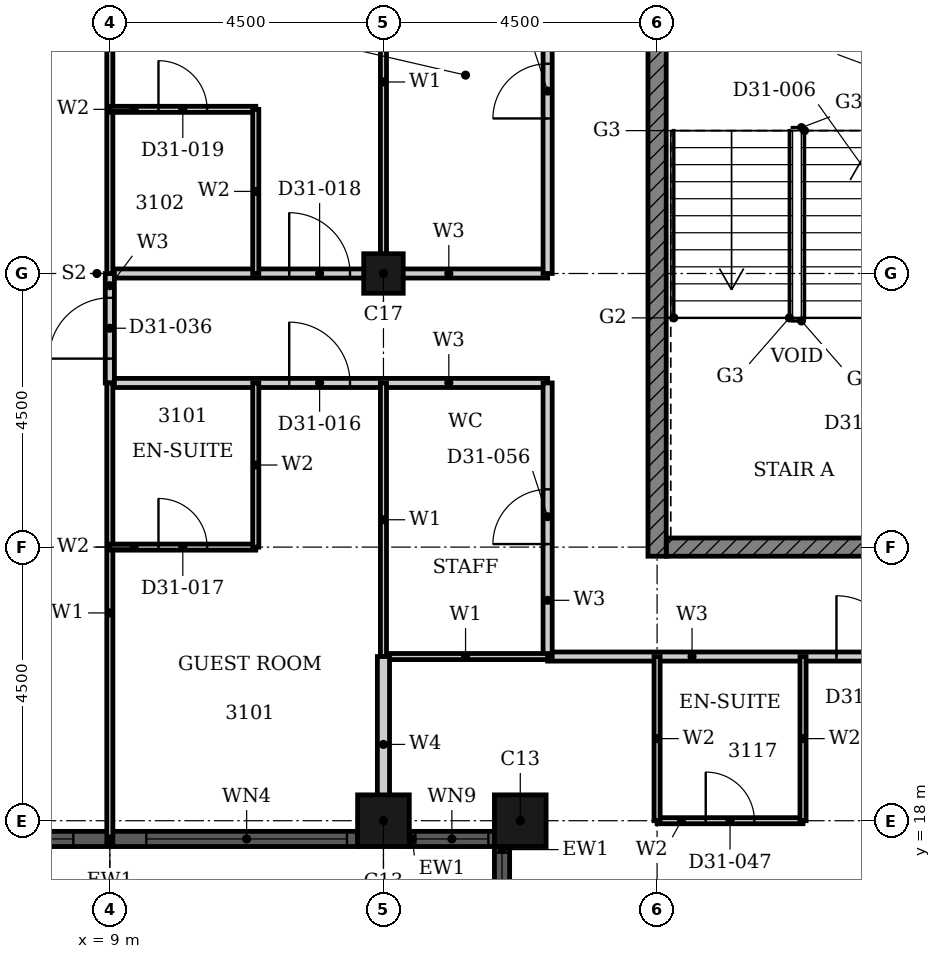
"""IFC4 building model, lengths in metres.
Left out: names, types, materials, properties, quantities, classifications, styles, units other than length and angle.
Written with IfcOpenShell. Run it as: python <this file> out.ifc"""

import sys

from ifc_helpers import new_model, si_unit, direction, frame, frame_2d, origin, origin_2d, place, context, subcontext, project, spatial, rectangle, hollow_rectangle, extrude, element, fill, save


model = new_model("IFC4")
c1 = context("Model", 3, precision=1e-05, world=origin(), true_north=direction((0.0, 1.0)))
c2 = subcontext(c1, "Body", "Model", "MODEL_VIEW")
j1 = project(units=[si_unit("LENGTHUNIT", "METRE"), si_unit("PLANEANGLEUNIT", "RADIAN")], contexts=[c1])
p1 = place(None, origin())
s1 = spatial("IfcSite", under=j1, at=p1, CompositionType="ELEMENT")
p2 = place(p1, origin())
s2 = spatial("IfcBuilding", under=s1, at=p2, CompositionType="ELEMENT")
p3 = place(p2, frame((0.0, 0.0, 126.0)))
s3 = spatial("IfcBuildingStorey", under=s2, at=p3, CompositionType="ELEMENT", Elevation=126.0)
for number, where, z_axis, x_axis in (
    (1, (13.5, 18.0, 0.0), (0.0, 0.0, 1.0), (1.0, 0.0, 0.0)),
    (2, (15.75, 18.0, 0.0), (0.0, 0.0, 1.0), (1.0, 0.0, 0.0)),
):
    element("IfcColumn", number, at=place(p3, frame(where, z_axis=z_axis, x_axis=x_axis)), inside=s3, PredefinedType="COLUMN", context=c2, shape_type="SweptSolid", body=[
        extrude(hollow_rectangle(XDim=0.85, YDim=0.85, WallThickness=0.026, at=origin_2d()), origin(), (0.0, 0.0, 1.0), 3.6),
    ])
p4 = place(p3, frame((13.5, 27.0, 0.0), z_axis=(0.0, 0.0, 1.0), x_axis=(1.0, 0.0, 0.0)))
e3 = element("IfcColumn", 3, at=p4, inside=s3, PredefinedType="COLUMN", context=c2, shape_type="SweptSolid", body=[
    extrude(hollow_rectangle(XDim=0.65, YDim=0.65, WallThickness=0.021, at=origin_2d()), origin(), (0.0, 0.0, 1.0), 3.6),
])
p5 = place(p3, frame((4.925, 17.7, 0.0), z_axis=(0.0, 0.0, 1.0), x_axis=(1.0, 0.0, 0.0)))
e4 = element("IfcWall", 4, at=p5, inside=s3, PredefinedType="SOLIDWALL", context=c2, shape_type="SweptSolid", body=[
    extrude(rectangle(XDim=8.15, YDim=0.25, at=frame_2d((4.075, 0.0))), origin(), (0.0, 0.0, 1.0), 3.6),
])
p6 = place(p5, frame((0.175, 0.0, 0.9)))
e5 = element("IfcOpeningElement", 5, at=p6, cuts=e4, PredefinedType="OPENING", context=c2, shape_type="SweptSolid", body=[
    extrude(rectangle(XDim=3.3, YDim=2.08, at=frame_2d((1.65, 1.04))), frame((0.0, 0.135, 0.0), z_axis=(0.0, -1.0, 0.0), x_axis=(1.0, 0.0, 0.0)), (0.0, 0.0, 1.0), 0.27),
])
p7 = place(p5, frame((4.675, 0.0, 0.9)))
e6 = element("IfcOpeningElement", 6, at=p7, cuts=e4, PredefinedType="OPENING", context=c2, shape_type="SweptSolid", body=[
    extrude(rectangle(XDim=3.3, YDim=2.08, at=frame_2d((1.65, 1.04))), frame((0.0, 0.135, 0.0), z_axis=(0.0, -1.0, 0.0), x_axis=(1.0, 0.0, 0.0)), (0.0, 0.0, 1.0), 0.27),
])
p8 = place(p3, frame((13.925, 17.7, 0.0), z_axis=(0.0, 0.0, 1.0), x_axis=(1.0, 0.0, 0.0)))
e7 = element("IfcWall", 7, at=p8, inside=s3, PredefinedType="SOLIDWALL", context=c2, shape_type="SweptSolid", body=[
    extrude(rectangle(XDim=1.4, YDim=0.25, at=frame_2d((0.7, 0.0))), origin(), (0.0, 0.0, 1.0), 3.6),
])
p9 = place(p8, frame((0.1, 0.0, 0.9)))
e8 = element("IfcOpeningElement", 8, at=p9, cuts=e7, PredefinedType="OPENING", context=c2, shape_type="SweptSolid", body=[
    extrude(rectangle(XDim=1.2, YDim=2.08, at=frame_2d((0.6, 1.04))), frame((0.0, 0.135, 0.0), z_axis=(0.0, -1.0, 0.0), x_axis=(1.0, 0.0, 0.0)), (0.0, 0.0, 1.0), 0.27),
])
p10 = place(p3, frame((15.45, 17.575, 0.0), z_axis=(0.0, 0.0, 1.0), x_axis=(0.0, -1.0, 0.0)))
e9 = element("IfcWall", 9, at=p10, inside=s3, PredefinedType="SOLIDWALL", context=c2, shape_type="SweptSolid", body=[
    extrude(rectangle(XDim=1.4, YDim=0.25, at=frame_2d((0.7, 0.0))), origin(), (0.0, 0.0, 1.0), 3.6),
])
p11 = place(p10, frame((0.1, 0.0, 0.9)))
e10 = element("IfcOpeningElement", 10, at=p11, cuts=e9, PredefinedType="OPENING", context=c2, shape_type="SweptSolid", body=[
    extrude(rectangle(XDim=1.2, YDim=2.08, at=frame_2d((0.6, 1.04))), frame((0.0, 0.135, 0.0), z_axis=(0.0, -1.0, 0.0), x_axis=(1.0, 0.0, 0.0)), (0.0, 0.0, 1.0), 0.27),
])
p12 = place(p3, frame((18.15, 22.5, 0.0), z_axis=(0.0, 0.0, 1.0), x_axis=(1.0, 0.0, 0.0)))
e11 = element("IfcWall", 11, at=p12, inside=s3, PredefinedType="SHEAR", context=c2, shape_type="SweptSolid", body=[
    extrude(rectangle(XDim=4.225, YDim=0.3, at=frame_2d((2.113, 0.0))), origin(), (0.0, 0.0, 1.0), 3.3),
])
p13 = place(p3, frame((18.0, 22.35, 0.0), z_axis=(0.0, 0.0, 1.0), x_axis=(0.0, 1.0, 0.0)))
e12 = element("IfcWall", 12, at=p13, inside=s3, PredefinedType="SHEAR", context=c2, shape_type="SweptSolid", body=[
    extrude(rectangle(XDim=9.3, YDim=0.3, at=frame_2d((4.65, 0.0))), origin(), (0.0, 0.0, 1.0), 3.3),
])
p14 = place(p3, frame((16.2, 20.7, 0.0), z_axis=(0.0, 0.0, 1.0), x_axis=(1.0, 0.0, 0.0)))
e13 = element("IfcWall", 13, at=p14, inside=s3, PredefinedType="PARTITIONING", context=c2, shape_type="SweptSolid", body=[
    extrude(rectangle(XDim=13.5, YDim=0.15, at=frame_2d((6.75, 0.0))), origin(), (0.0, 0.0, 1.0), 3.3),
])
p15 = place(p14, frame((4.75, 0.0, 0.0)))
e14 = element("IfcOpeningElement", 14, at=p15, cuts=e13, PredefinedType="OPENING", context=c2, shape_type="SweptSolid", body=[
    extrude(rectangle(XDim=1.0, YDim=2.1, at=frame_2d((0.5, 1.05))), frame((0.0, 0.085, 0.0), z_axis=(0.0, -1.0, 0.0), x_axis=(1.0, 0.0, 0.0)), (0.0, 0.0, 1.0), 0.17),
])
p16 = place(p14, frame((9.45, 0.0, 0.0)))
e15 = element("IfcOpeningElement", 15, at=p16, cuts=e13, PredefinedType="OPENING", context=c2, shape_type="SweptSolid", body=[
    extrude(rectangle(XDim=0.9, YDim=2.1, at=frame_2d((0.45, 1.05))), frame((0.0, 0.085, 0.0), z_axis=(0.0, -1.0, 0.0), x_axis=(1.0, 0.0, 0.0)), (0.0, 0.0, 1.0), 0.17),
])
p17 = place(p3, frame((9.0, 25.2, 0.0), z_axis=(0.0, 0.0, 1.0), x_axis=(1.0, 0.0, 0.0)))
e16 = element("IfcWall", 16, at=p17, inside=s3, PredefinedType="PARTITIONING", context=c2, shape_type="SweptSolid", body=[
    extrude(rectangle(XDim=7.2, YDim=0.15, at=frame_2d((3.6, 0.0))), origin(), (0.0, 0.0, 1.0), 3.3),
])
p18 = place(p17, frame((2.95, 0.0, 0.0)))
e17 = element("IfcOpeningElement", 17, at=p18, cuts=e16, PredefinedType="OPENING", context=c2, shape_type="SweptSolid", body=[
    extrude(rectangle(XDim=1.0, YDim=2.1, at=frame_2d((0.5, 1.05))), frame((0.0, 0.085, 0.0), z_axis=(0.0, -1.0, 0.0), x_axis=(1.0, 0.0, 0.0)), (0.0, 0.0, 1.0), 0.17),
])
p19 = place(p3, frame((9.0, 27.0, 0.0), z_axis=(0.0, 0.0, 1.0), x_axis=(1.0, 0.0, 0.0)))
e18 = element("IfcWall", 18, at=p19, inside=s3, PredefinedType="PARTITIONING", context=c2, shape_type="SweptSolid", body=[
    extrude(rectangle(XDim=7.2, YDim=0.15, at=frame_2d((3.6, 0.0))), origin(), (0.0, 0.0, 1.0), 2.58),
])
p20 = place(p19, frame((2.95, 0.0, 0.0)))
e19 = element("IfcOpeningElement", 19, at=p20, cuts=e18, PredefinedType="OPENING", context=c2, shape_type="SweptSolid", body=[
    extrude(rectangle(XDim=1.0, YDim=2.1, at=frame_2d((0.5, 1.05))), frame((0.0, 0.085, 0.0), z_axis=(0.0, -1.0, 0.0), x_axis=(1.0, 0.0, 0.0)), (0.0, 0.0, 1.0), 0.17),
])
p21 = place(p3, frame((16.2, 27.0, 0.0), z_axis=(0.0, 0.0, 1.0), x_axis=(0.0, 1.0, 0.0)))
e20 = element("IfcWall", 20, at=p21, inside=s3, PredefinedType="PARTITIONING", context=c2, shape_type="SweptSolid", body=[
    extrude(rectangle(XDim=6.3, YDim=0.15, at=frame_2d((3.15, 0.0))), origin(), (0.0, 0.0, 1.0), 3.3),
])
p22 = place(p21, frame((2.55, 0.0, 0.0)))
e21 = element("IfcOpeningElement", 21, at=p22, cuts=e20, PredefinedType="OPENING", context=c2, shape_type="SweptSolid", body=[
    extrude(rectangle(XDim=0.9, YDim=2.1, at=frame_2d((0.45, 1.05))), frame((0.0, 0.085, 0.0), z_axis=(0.0, -1.0, 0.0), x_axis=(1.0, 0.0, 0.0)), (0.0, 0.0, 1.0), 0.17),
])
p23 = place(p3, frame((16.2, 20.7, 0.0), z_axis=(0.0, 0.0, 1.0), x_axis=(0.0, 1.0, 0.0)))
e22 = element("IfcWall", 22, at=p23, inside=s3, PredefinedType="PARTITIONING", context=c2, shape_type="SweptSolid", body=[
    extrude(rectangle(XDim=4.5, YDim=0.15, at=frame_2d((2.25, 0.0))), origin(), (0.0, 0.0, 1.0), 3.3),
])
p24 = place(p23, frame((1.85, 0.0, 0.0)))
e23 = element("IfcOpeningElement", 23, at=p24, cuts=e22, PredefinedType="OPENING", context=c2, shape_type="SweptSolid", body=[
    extrude(rectangle(XDim=0.9, YDim=2.1, at=frame_2d((0.45, 1.05))), frame((0.0, 0.085, 0.0), z_axis=(0.0, -1.0, 0.0), x_axis=(1.0, 0.0, 0.0)), (0.0, 0.0, 1.0), 0.17),
])
p25 = place(p3, frame((9.0, 25.2, 0.0), z_axis=(0.0, 0.0, 1.0), x_axis=(0.0, 1.0, 0.0)))
e24 = element("IfcWall", 24, at=p25, inside=s3, PredefinedType="PARTITIONING", context=c2, shape_type="SweptSolid", body=[
    extrude(rectangle(XDim=1.8, YDim=0.15, at=frame_2d((0.9, 0.0))), origin(), (0.0, 0.0, 1.0), 3.3),
])
p26 = place(p25, frame((0.4, 0.0, 0.0)))
e25 = element("IfcOpeningElement", 25, at=p26, cuts=e24, PredefinedType="OPENING", context=c2, shape_type="SweptSolid", body=[
    extrude(rectangle(XDim=1.0, YDim=2.1, at=frame_2d((0.5, 1.05))), frame((0.0, 0.085, 0.0), z_axis=(0.0, -1.0, 0.0), x_axis=(1.0, 0.0, 0.0)), (0.0, 0.0, 1.0), 0.17),
])
p27 = place(p3, frame((13.5, 20.7, 0.0), z_axis=(0.0, 0.0, 1.0), x_axis=(1.0, 0.0, 0.0)))
e26 = element("IfcWall", 26, at=p27, inside=s3, PredefinedType="PARTITIONING", context=c2, shape_type="SweptSolid", body=[
    extrude(rectangle(XDim=2.7, YDim=0.1, at=frame_2d((1.35, 0.0))), origin(), (0.0, 0.0, 1.0), 3.3),
])
p28 = place(p3, frame((13.5, 27.0, 0.0), z_axis=(0.0, 0.0, 1.0), x_axis=(0.0, 1.0, 0.0)))
e27 = element("IfcWall", 27, at=p28, inside=s3, PredefinedType="PARTITIONING", context=c2, shape_type="SweptSolid", body=[
    extrude(rectangle(XDim=6.3, YDim=0.1, at=frame_2d((3.15, 0.0))), origin(), (0.0, 0.0, 1.0), 2.38),
])
p29 = place(p3, frame((13.5, 20.7, 0.0), z_axis=(0.0, 0.0, 1.0), x_axis=(0.0, 1.0, 0.0)))
e28 = element("IfcWall", 28, at=p29, inside=s3, PredefinedType="PARTITIONING", context=c2, shape_type="SweptSolid", body=[
    extrude(rectangle(XDim=4.5, YDim=0.1, at=frame_2d((2.25, 0.0))), origin(), (0.0, 0.0, 1.0), 2.38),
])
p30 = place(p3, frame((9.0, 27.0, 0.0), z_axis=(0.0, 0.0, 1.0), x_axis=(0.0, 1.0, 0.0)))
e29 = element("IfcWall", 29, at=p30, inside=s3, PredefinedType="PARTITIONING", context=c2, shape_type="SweptSolid", body=[
    extrude(rectangle(XDim=9.365, YDim=0.1, at=frame_2d((4.683, 0.0))), origin(), (0.0, 0.0, 1.0), 3.3),
])
p31 = place(p3, frame((9.0, 17.635, 0.0), z_axis=(0.0, 0.0, 1.0), x_axis=(0.0, 1.0, 0.0)))
e30 = element("IfcWall", 30, at=p31, inside=s3, PredefinedType="PARTITIONING", context=c2, shape_type="SweptSolid", body=[
    extrude(rectangle(XDim=7.565, YDim=0.1, at=frame_2d((3.782, 0.0))), origin(), (0.0, 0.0, 1.0), 3.3),
])
p32 = place(p3, frame((13.5, 17.81, 0.0), z_axis=(0.0, 0.0, 1.0), x_axis=(0.0, 1.0, 0.0)))
e31 = element("IfcWall", 31, at=p32, inside=s3, PredefinedType="PARTITIONING", context=c2, shape_type="SweptSolid", body=[
    extrude(rectangle(XDim=2.89, YDim=0.2, at=frame_2d((1.445, 0.0))), origin(), (0.0, 0.0, 1.0), 2.38),
])
p33 = place(p3, frame((18.0, 18.0, 0.0), z_axis=(0.0, 0.0, 1.0), x_axis=(1.0, 0.0, 0.0)))
e32 = element("IfcWall", 32, at=p33, inside=s3, PredefinedType="PARTITIONING", context=c2, shape_type="SweptSolid", body=[
    extrude(rectangle(XDim=2.4, YDim=0.1, at=frame_2d((1.2, 0.0))), origin(), (0.0, 0.0, 1.0), 3.3),
])
p34 = place(p33, frame((0.8, 0.0, 0.0)))
e33 = element("IfcOpeningElement", 33, at=p34, cuts=e32, PredefinedType="OPENING", context=c2, shape_type="SweptSolid", body=[
    extrude(rectangle(XDim=0.8, YDim=2.1, at=frame_2d((0.4, 1.05))), frame((0.0, 0.06, 0.0), z_axis=(0.0, -1.0, 0.0), x_axis=(1.0, 0.0, 0.0)), (0.0, 0.0, 1.0), 0.12),
])
p35 = place(p3, frame((9.0, 22.5, 0.0), z_axis=(0.0, 0.0, 1.0), x_axis=(1.0, 0.0, 0.0)))
e34 = element("IfcWall", 34, at=p35, inside=s3, PredefinedType="PARTITIONING", context=c2, shape_type="SweptSolid", body=[
    extrude(rectangle(XDim=2.4, YDim=0.1, at=frame_2d((1.2, 0.0))), origin(), (0.0, 0.0, 1.0), 2.58),
])
p36 = place(p35, frame((0.8, 0.0, 0.0)))
e35 = element("IfcOpeningElement", 35, at=p36, cuts=e34, PredefinedType="OPENING", context=c2, shape_type="SweptSolid", body=[
    extrude(rectangle(XDim=0.8, YDim=2.1, at=frame_2d((0.4, 1.05))), frame((0.0, 0.06, 0.0), z_axis=(0.0, -1.0, 0.0), x_axis=(1.0, 0.0, 0.0)), (0.0, 0.0, 1.0), 0.12),
])
p37 = place(p3, frame((9.0, 29.7, 0.0), z_axis=(0.0, 0.0, 1.0), x_axis=(1.0, 0.0, 0.0)))
e36 = element("IfcWall", 36, at=p37, inside=s3, PredefinedType="PARTITIONING", context=c2, shape_type="SweptSolid", body=[
    extrude(rectangle(XDim=2.4, YDim=0.1, at=frame_2d((1.2, 0.0))), origin(), (0.0, 0.0, 1.0), 3.3),
])
p38 = place(p37, frame((0.8, 0.0, 0.0)))
e37 = element("IfcOpeningElement", 37, at=p38, cuts=e36, PredefinedType="OPENING", context=c2, shape_type="SweptSolid", body=[
    extrude(rectangle(XDim=0.8, YDim=2.1, at=frame_2d((0.4, 1.05))), frame((0.0, 0.06, 0.0), z_axis=(0.0, -1.0, 0.0), x_axis=(1.0, 0.0, 0.0)), (0.0, 0.0, 1.0), 0.12),
])
for number, where, z_axis, x_axis in (
    (38, (11.4, 27.0, 0.0), (0.0, 0.0, 1.0), (0.0, 1.0, 0.0)),
    (39, (11.4, 22.5, 0.0), (0.0, 0.0, 1.0), (0.0, 1.0, 0.0)),
    (40, (18.0, 18.0, 0.0), (0.0, 0.0, 1.0), (0.0, 1.0, 0.0)),
    (41, (20.4, 18.0, 0.0), (0.0, 0.0, 1.0), (0.0, 1.0, 0.0)),
):
    element("IfcWall", number, at=place(p3, frame(where, z_axis=z_axis, x_axis=x_axis)), inside=s3, PredefinedType="PARTITIONING", context=c2, shape_type="SweptSolid", body=[
        extrude(rectangle(XDim=2.7, YDim=0.1, at=frame_2d((1.35, 0.0))), origin(), (0.0, 0.0, 1.0), 3.3),
    ])
p39 = place(p6, origin())
e42 = element("IfcWindow", 42, at=p39, inside=s3, PartitioningType="SINGLE_PANEL", PredefinedType="WINDOW", context=c2, shape_type="SweptSolid", body=[
    extrude(rectangle(XDim=3.3, YDim=2.08, at=frame_2d((1.65, 1.04))), frame((0.0, 0.03, 0.0), z_axis=(0.0, -1.0, 0.0), x_axis=(1.0, 0.0, 0.0)), (0.0, 0.0, 1.0), 0.06),
])
fill(e5, e42)
p40 = place(p7, origin())
e43 = element("IfcWindow", 43, at=p40, inside=s3, PartitioningType="SINGLE_PANEL", PredefinedType="WINDOW", context=c2, shape_type="SweptSolid", body=[
    extrude(rectangle(XDim=3.3, YDim=2.08, at=frame_2d((1.65, 1.04))), frame((0.0, 0.03, 0.0), z_axis=(0.0, -1.0, 0.0), x_axis=(1.0, 0.0, 0.0)), (0.0, 0.0, 1.0), 0.06),
])
fill(e6, e43)
p41 = place(p9, origin())
e44 = element("IfcWindow", 44, at=p41, inside=s3, PartitioningType="SINGLE_PANEL", PredefinedType="WINDOW", context=c2, shape_type="SweptSolid", body=[
    extrude(rectangle(XDim=1.2, YDim=2.08, at=frame_2d((0.6, 1.04))), frame((0.0, 0.03, 0.0), z_axis=(0.0, -1.0, 0.0), x_axis=(1.0, 0.0, 0.0)), (0.0, 0.0, 1.0), 0.06),
])
fill(e8, e44)
p42 = place(p11, origin())
e45 = element("IfcWindow", 45, at=p42, inside=s3, PartitioningType="SINGLE_PANEL", PredefinedType="WINDOW", context=c2, shape_type="SweptSolid", body=[
    extrude(rectangle(XDim=1.2, YDim=2.08, at=frame_2d((0.6, 1.04))), frame((0.0, 0.03, 0.0), z_axis=(0.0, -1.0, 0.0), x_axis=(1.0, 0.0, 0.0)), (0.0, 0.0, 1.0), 0.06),
])
fill(e10, e45)
p43 = place(p18, origin())
e46 = element("IfcDoor", 46, at=p43, inside=s3, OperationType="SINGLE_SWING_RIGHT", PredefinedType="DOOR", context=c2, shape_type="SweptSolid", body=[
    extrude(rectangle(XDim=1.0, YDim=2.1, at=frame_2d((0.5, 1.05))), frame((0.0, 0.025, 0.0), z_axis=(0.0, -1.0, 0.0), x_axis=(1.0, 0.0, 0.0)), (0.0, 0.0, 1.0), 0.05),
])
fill(e17, e46)
p44 = place(p36, origin())
e47 = element("IfcDoor", 47, at=p44, inside=s3, OperationType="SINGLE_SWING_RIGHT", PredefinedType="DOOR", context=c2, shape_type="SweptSolid", body=[
    extrude(rectangle(XDim=0.8, YDim=2.1, at=frame_2d((0.4, 1.05))), frame((0.0, 0.025, 0.0), z_axis=(0.0, -1.0, 0.0), x_axis=(1.0, 0.0, 0.0)), (0.0, 0.0, 1.0), 0.05),
])
fill(e35, e47)
p45 = place(p20, origin())
e48 = element("IfcDoor", 48, at=p45, inside=s3, OperationType="SINGLE_SWING_RIGHT", PredefinedType="DOOR", context=c2, shape_type="SweptSolid", body=[
    extrude(rectangle(XDim=1.0, YDim=2.1, at=frame_2d((0.5, 1.05))), frame((0.0, 0.025, 0.0), z_axis=(0.0, -1.0, 0.0), x_axis=(1.0, 0.0, 0.0)), (0.0, 0.0, 1.0), 0.05),
])
fill(e19, e48)
p46 = place(p38, origin())
e49 = element("IfcDoor", 49, at=p46, inside=s3, OperationType="SINGLE_SWING_RIGHT", PredefinedType="DOOR", context=c2, shape_type="SweptSolid", body=[
    extrude(rectangle(XDim=0.8, YDim=2.1, at=frame_2d((0.4, 1.05))), frame((0.0, 0.025, 0.0), z_axis=(0.0, -1.0, 0.0), x_axis=(1.0, 0.0, 0.0)), (0.0, 0.0, 1.0), 0.05),
])
fill(e37, e49)
p47 = place(p26, origin())
e50 = element("IfcDoor", 50, at=p47, inside=s3, OperationType="SINGLE_SWING_LEFT", PredefinedType="DOOR", context=c2, shape_type="SweptSolid", body=[
    extrude(rectangle(XDim=1.0, YDim=2.1, at=frame_2d((0.5, 1.05))), frame((0.0, 0.025, 0.0), z_axis=(0.0, -1.0, 0.0), x_axis=(1.0, 0.0, 0.0)), (0.0, 0.0, 1.0), 0.05),
])
fill(e25, e50)
p48 = place(p15, origin())
e51 = element("IfcDoor", 51, at=p48, inside=s3, OperationType="SINGLE_SWING_RIGHT", PredefinedType="DOOR", context=c2, shape_type="SweptSolid", body=[
    extrude(rectangle(XDim=1.0, YDim=2.1, at=frame_2d((0.5, 1.05))), frame((0.0, 0.025, 0.0), z_axis=(0.0, -1.0, 0.0), x_axis=(1.0, 0.0, 0.0)), (0.0, 0.0, 1.0), 0.05),
])
fill(e14, e51)
p49 = place(p34, origin())
e52 = element("IfcDoor", 52, at=p49, inside=s3, OperationType="SINGLE_SWING_RIGHT", PredefinedType="DOOR", context=c2, shape_type="SweptSolid", body=[
    extrude(rectangle(XDim=0.8, YDim=2.1, at=frame_2d((0.4, 1.05))), frame((0.0, 0.025, 0.0), z_axis=(0.0, -1.0, 0.0), x_axis=(1.0, 0.0, 0.0)), (0.0, 0.0, 1.0), 0.05),
])
fill(e33, e52)
p50 = place(p24, origin())
e53 = element("IfcDoor", 53, at=p50, inside=s3, OperationType="SINGLE_SWING_RIGHT", PredefinedType="DOOR", context=c2, shape_type="SweptSolid", body=[
    extrude(rectangle(XDim=0.9, YDim=2.1, at=frame_2d((0.45, 1.05))), frame((0.0, 0.025, 0.0), z_axis=(0.0, -1.0, 0.0), x_axis=(1.0, 0.0, 0.0)), (0.0, 0.0, 1.0), 0.05),
])
fill(e23, e53)
p51 = place(p22, origin())
e54 = element("IfcDoor", 54, at=p51, inside=s3, OperationType="SINGLE_SWING_LEFT", PredefinedType="DOOR", context=c2, shape_type="SweptSolid", body=[
    extrude(rectangle(XDim=0.9, YDim=2.1, at=frame_2d((0.45, 1.05))), frame((0.0, 0.025, 0.0), z_axis=(0.0, -1.0, 0.0), x_axis=(1.0, 0.0, 0.0)), (0.0, 0.0, 1.0), 0.05),
])
fill(e21, e54)
save(model, sys.argv[1])
